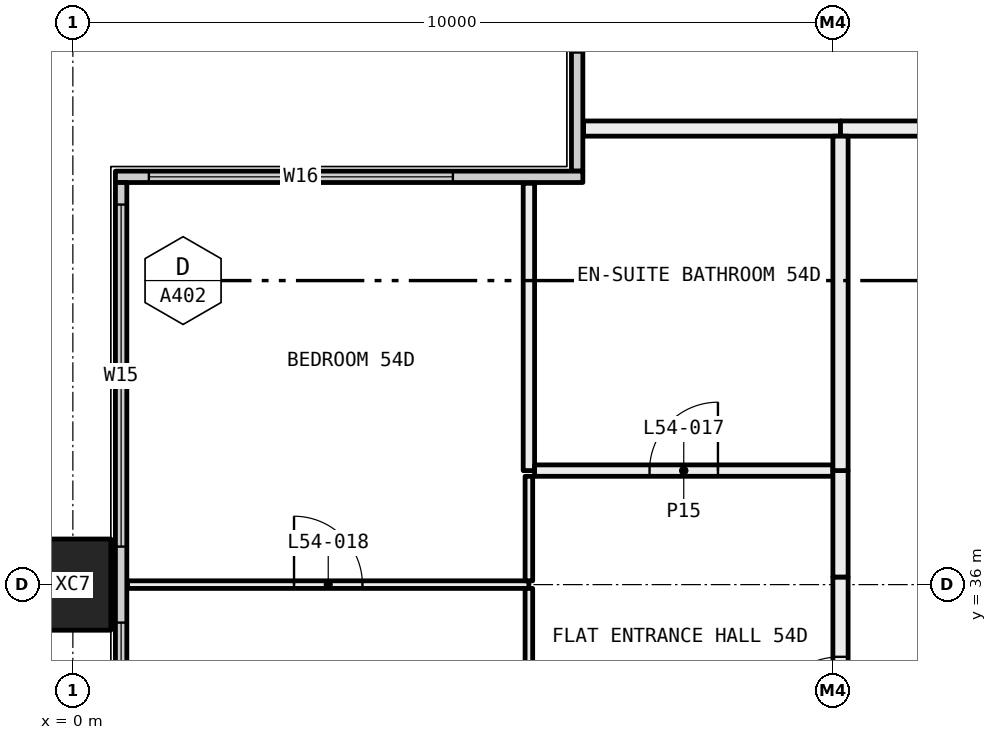
"""IFC4 building model, lengths in metres.
Left out: names, types, materials, properties, quantities, classifications, styles, units other than length and angle.
Written with IfcOpenShell. Run it as: python <this file> out.ifc"""

import sys

from ifc_helpers import new_model, si_unit, direction, frame, frame_2d, origin, origin_2d, place, context, subcontext, project, spatial, rectangle, hollow_rectangle, extrude, element, fill, save


model = new_model("IFC4")
c1 = context("Model", 3, precision=1e-05, world=origin(), true_north=direction((0.0, 1.0)))
c2 = subcontext(c1, "Body", "Model", "MODEL_VIEW")
j1 = project(units=[si_unit("LENGTHUNIT", "METRE"), si_unit("PLANEANGLEUNIT", "RADIAN")], contexts=[c1])
p1 = place(None, origin())
s1 = spatial("IfcSite", under=j1, at=p1, CompositionType="ELEMENT")
p2 = place(p1, origin())
s2 = spatial("IfcBuilding", under=s1, at=p2, CompositionType="ELEMENT")
p3 = place(p2, frame((0.0, 0.0, 203.1)))
s3 = spatial("IfcBuildingStorey", under=s2, at=p3, CompositionType="ELEMENT", Elevation=203.1)
p4 = place(p3, frame((0.0, 36.0, -0.4), z_axis=(0.0, 0.0, 1.0), x_axis=(0.0, 1.0, 0.0)))
e1 = element("IfcColumn", 1, at=p4, inside=s3, PredefinedType="COLUMN", context=c2, shape_type="SweptSolid", body=[
    extrude(hollow_rectangle(XDim=1.2, YDim=1.0, WallThickness=0.045, at=origin_2d()), origin(), (0.0, 0.0, 1.0), 3.45),
])
p5 = place(p3, frame((6.635, 41.44, 0.0), z_axis=(0.0, 0.0, 1.0), x_axis=(0.0, 1.0, 0.0)))
e2 = element("IfcWall", 2, at=p5, inside=s3, PredefinedType="ELEMENTEDWALL", context=c2, shape_type="SweptSolid", body=[
    extrude(rectangle(XDim=5.85, YDim=0.15, at=frame_2d((2.925, 0.0))), origin(), (0.0, 0.0, 1.0), 3.05),
])
p6 = place(p5, frame((1.56, 0.0, 0.45)))
e3 = element("IfcOpeningElement", 3, at=p6, cuts=e2, PredefinedType="OPENING", context=c2, shape_type="SweptSolid", body=[
    extrude(rectangle(XDim=4.0, YDim=2.55, at=frame_2d((2.0, 1.275))), frame((0.0, 0.085, 0.0), z_axis=(0.0, -1.0, 0.0), x_axis=(1.0, 0.0, 0.0)), (0.0, 0.0, 1.0), 0.17),
])
p7 = place(p3, frame((0.56, 41.365, 0.0), z_axis=(0.0, 0.0, 1.0), x_axis=(1.0, 0.0, 0.0)))
e4 = element("IfcWall", 4, at=p7, inside=s3, PredefinedType="ELEMENTEDWALL", context=c2, shape_type="SweptSolid", body=[
    extrude(rectangle(XDim=6.15, YDim=0.15, at=frame_2d((3.075, 0.0))), origin(), (0.0, 0.0, 1.0), 3.05),
])
p8 = place(p7, frame((0.44, 0.0, 0.45)))
e5 = element("IfcOpeningElement", 5, at=p8, cuts=e4, PredefinedType="OPENING", context=c2, shape_type="SweptSolid", body=[
    extrude(rectangle(XDim=4.0, YDim=2.55, at=frame_2d((2.0, 1.275))), frame((0.0, 0.085, 0.0), z_axis=(0.0, -1.0, 0.0), x_axis=(1.0, 0.0, 0.0)), (0.0, 0.0, 1.0), 0.17),
])
p9 = place(p3, frame((0.635, 18.71, 0.0), z_axis=(0.0, 0.0, 1.0), x_axis=(0.0, 1.0, 0.0)))
e6 = element("IfcWall", 6, at=p9, inside=s3, PredefinedType="ELEMENTEDWALL", context=c2, shape_type="SweptSolid", body=[
    extrude(rectangle(XDim=22.58, YDim=0.15, at=frame_2d((11.29, 0.0))), origin(), (0.0, 0.0, 1.0), 3.05),
])
p10 = place(p9, frame((0.29, 0.0, 0.45)))
e7 = element("IfcOpeningElement", 7, at=p10, cuts=e6, PredefinedType="OPENING", context=c2, shape_type="SweptSolid", body=[
    extrude(rectangle(XDim=4.5, YDim=2.55, at=frame_2d((2.25, 1.275))), frame((0.0, 0.085, 0.0), z_axis=(0.0, -1.0, 0.0), x_axis=(1.0, 0.0, 0.0)), (0.0, 0.0, 1.0), 0.17),
])
p11 = place(p9, frame((5.79, 0.0, 0.45)))
e8 = element("IfcOpeningElement", 8, at=p11, cuts=e6, PredefinedType="OPENING", context=c2, shape_type="SweptSolid", body=[
    extrude(rectangle(XDim=3.0, YDim=2.55, at=frame_2d((1.5, 1.275))), frame((0.0, 0.085, 0.0), z_axis=(0.0, -1.0, 0.0), x_axis=(1.0, 0.0, 0.0)), (0.0, 0.0, 1.0), 0.17),
])
p12 = place(p9, frame((14.79, 0.0, 0.45)))
e9 = element("IfcOpeningElement", 9, at=p12, cuts=e6, PredefinedType="OPENING", context=c2, shape_type="SweptSolid", body=[
    extrude(rectangle(XDim=2.0, YDim=2.55, at=frame_2d((1.0, 1.275))), frame((0.0, 0.085, 0.0), z_axis=(0.0, -1.0, 0.0), x_axis=(1.0, 0.0, 0.0)), (0.0, 0.0, 1.0), 0.17),
])
p13 = place(p9, frame((17.79, 0.0, 0.45)))
e10 = element("IfcOpeningElement", 10, at=p13, cuts=e6, PredefinedType="OPENING", context=c2, shape_type="SweptSolid", body=[
    extrude(rectangle(XDim=4.5, YDim=2.55, at=frame_2d((2.25, 1.275))), frame((0.0, 0.085, 0.0), z_axis=(0.0, -1.0, 0.0), x_axis=(1.0, 0.0, 0.0)), (0.0, 0.0, 1.0), 0.17),
])
p14 = place(p3, frame((6.72, 42.0, 0.0), z_axis=(0.0, 0.0, 1.0), x_axis=(1.0, 0.0, 0.0)))
e11 = element("IfcWall", 11, at=p14, inside=s3, PredefinedType="PARTITIONING", context=c2, shape_type="SweptSolid", body=[
    extrude(rectangle(XDim=3.38, YDim=0.2, at=frame_2d((1.69, 0.0))), origin(), (0.0, 0.0, 1.0), 3.05),
])
p15 = place(p3, frame((10.1, 42.0, 0.0), z_axis=(0.0, 0.0, 1.0), x_axis=(1.0, 0.0, 0.0)))
e12 = element("IfcWall", 12, at=p15, inside=s3, PredefinedType="PARTITIONING", context=c2, shape_type="SweptSolid", body=[
    extrude(rectangle(XDim=7.9, YDim=0.2, at=frame_2d((3.95, 0.0))), origin(), (0.0, 0.0, 1.0), 3.05),
])
p16 = place(p3, frame((6.0, 36.0, 0.0), z_axis=(0.0, 0.0, 1.0), x_axis=(-1.0, 0.0, 0.0)))
e13 = element("IfcWall", 13, at=p16, inside=s3, PredefinedType="PARTITIONING", context=c2, shape_type="SweptSolid", body=[
    extrude(rectangle(XDim=5.28, YDim=0.1, at=frame_2d((2.64, 0.0))), origin(), (0.0, 0.0, 1.0), 2.45),
])
p17 = place(p16, frame((2.19, 0.0, 0.0)))
e14 = element("IfcOpeningElement", 14, at=p17, cuts=e13, PredefinedType="OPENING", context=c2, shape_type="SweptSolid", body=[
    extrude(rectangle(XDim=0.9, YDim=2.1, at=frame_2d((0.45, 1.05))), frame((0.0, 0.06, 0.0), z_axis=(0.0, -1.0, 0.0), x_axis=(1.0, 0.0, 0.0)), (0.0, 0.0, 1.0), 0.12),
])
p18 = place(p3, frame((6.0, 33.0, 0.0), z_axis=(0.0, 0.0, 1.0), x_axis=(0.0, 1.0, 0.0)))
e15 = element("IfcWall", 15, at=p18, inside=s3, PredefinedType="PARTITIONING", context=c2, shape_type="SweptSolid", body=[
    extrude(rectangle(XDim=2.95, YDim=0.1, at=frame_2d((1.475, 0.0))), origin(), (0.0, 0.0, 1.0), 2.45),
])
p19 = place(p18, frame((1.025, 0.0, 0.0)))
e16 = element("IfcOpeningElement", 16, at=p19, cuts=e15, PredefinedType="OPENING", context=c2, shape_type="SweptSolid", body=[
    extrude(rectangle(XDim=0.9, YDim=2.1, at=frame_2d((0.45, 1.05))), frame((0.0, 0.06, 0.0), z_axis=(0.0, -1.0, 0.0), x_axis=(1.0, 0.0, 0.0)), (0.0, 0.0, 1.0), 0.12),
])
p20 = place(p3, frame((6.0, 36.05, 0.0), z_axis=(0.0, 0.0, 1.0), x_axis=(0.0, 1.0, 0.0)))
e17 = element("IfcWall", 17, at=p20, inside=s3, PredefinedType="PARTITIONING", context=c2, shape_type="SweptSolid", body=[
    extrude(rectangle(XDim=1.375, YDim=0.1, at=frame_2d((0.688, 0.0))), origin(), (0.0, 0.0, 1.0), 2.45),
])
p21 = place(p3, frame((6.0, 37.5, 0.0), z_axis=(0.0, 0.0, 1.0), x_axis=(0.0, 1.0, 0.0)))
e18 = element("IfcWall", 18, at=p21, inside=s3, PredefinedType="PARTITIONING", context=c2, shape_type="SweptSolid", body=[
    extrude(rectangle(XDim=3.78, YDim=0.15, at=frame_2d((1.89, 0.0))), origin(), (0.0, 0.0, 1.0), 3.05),
])
p22 = place(p3, frame((10.0, 37.5, 0.0), z_axis=(0.0, 0.0, 1.0), x_axis=(-1.0, 0.0, 0.0)))
e19 = element("IfcWall", 19, at=p22, inside=s3, PredefinedType="PARTITIONING", context=c2, shape_type="SweptSolid", body=[
    extrude(rectangle(XDim=3.925, YDim=0.15, at=frame_2d((1.962, 0.0))), origin(), (0.0, 0.0, 1.0), 3.05),
])
p23 = place(p22, frame((1.512, 0.0, 0.0)))
e20 = element("IfcOpeningElement", 20, at=p23, cuts=e19, PredefinedType="OPENING", context=c2, shape_type="SweptSolid", body=[
    extrude(rectangle(XDim=0.9, YDim=2.1, at=frame_2d((0.45, 1.05))), frame((0.0, 0.085, 0.0), z_axis=(0.0, -1.0, 0.0), x_axis=(1.0, 0.0, 0.0)), (0.0, 0.0, 1.0), 0.17),
])
p24 = place(p3, frame((10.1, 33.0, 0.0), z_axis=(0.0, 0.0, 1.0), x_axis=(0.0, 1.0, 0.0)))
e21 = element("IfcWall", 21, at=p24, inside=s3, PredefinedType="PARTITIONING", context=c2, shape_type="SweptSolid", body=[
    extrude(rectangle(XDim=3.1, YDim=0.2, at=frame_2d((1.55, 0.0))), origin(), (0.0, 0.0, 1.0), 2.45),
])
p25 = place(p24, frame((1.05, 0.0, 0.0)))
e22 = element("IfcOpeningElement", 22, at=p25, cuts=e21, PredefinedType="OPENING", context=c2, shape_type="SweptSolid", body=[
    extrude(rectangle(XDim=1.0, YDim=2.1, at=frame_2d((0.5, 1.05))), frame((0.0, 0.11, 0.0), z_axis=(0.0, -1.0, 0.0), x_axis=(1.0, 0.0, 0.0)), (0.0, 0.0, 1.0), 0.22),
])
p26 = place(p3, frame((10.1, 36.1, 0.0), z_axis=(0.0, 0.0, 1.0), x_axis=(0.0, 1.0, 0.0)))
e23 = element("IfcWall", 23, at=p26, inside=s3, PredefinedType="PARTITIONING", context=c2, shape_type="SweptSolid", body=[
    extrude(rectangle(XDim=1.4, YDim=0.2, at=frame_2d((0.7, 0.0))), origin(), (0.0, 0.0, 1.0), 3.05),
])
p27 = place(p3, frame((10.1, 37.5, 0.0), z_axis=(0.0, 0.0, 1.0), x_axis=(0.0, 1.0, 0.0)))
e24 = element("IfcWall", 24, at=p27, inside=s3, PredefinedType="PARTITIONING", context=c2, shape_type="SweptSolid", body=[
    extrude(rectangle(XDim=4.4, YDim=0.2, at=frame_2d((2.2, 0.0))), origin(), (0.0, 0.0, 1.0), 3.05),
])
p28 = place(p8, origin())
e25 = element("IfcWindow", 25, at=p28, inside=s3, PartitioningType="SINGLE_PANEL", PredefinedType="WINDOW", context=c2, shape_type="SweptSolid", body=[
    extrude(rectangle(XDim=4.0, YDim=2.55, at=frame_2d((2.0, 1.275))), frame((0.0, 0.03, 0.0), z_axis=(0.0, -1.0, 0.0), x_axis=(1.0, 0.0, 0.0)), (0.0, 0.0, 1.0), 0.06),
])
fill(e5, e25)
p29 = place(p12, origin())
e26 = element("IfcWindow", 26, at=p29, inside=s3, PartitioningType="SINGLE_PANEL", PredefinedType="WINDOW", context=c2, shape_type="SweptSolid", body=[
    extrude(rectangle(XDim=2.0, YDim=2.55, at=frame_2d((1.0, 1.275))), frame((0.0, 0.03, 0.0), z_axis=(0.0, -1.0, 0.0), x_axis=(1.0, 0.0, 0.0)), (0.0, 0.0, 1.0), 0.06),
])
fill(e9, e26)
p30 = place(p13, origin())
e27 = element("IfcWindow", 27, at=p30, inside=s3, PartitioningType="SINGLE_PANEL", PredefinedType="WINDOW", context=c2, shape_type="SweptSolid", body=[
    extrude(rectangle(XDim=4.5, YDim=2.55, at=frame_2d((2.25, 1.275))), frame((0.0, 0.03, 0.0), z_axis=(0.0, -1.0, 0.0), x_axis=(1.0, 0.0, 0.0)), (0.0, 0.0, 1.0), 0.06),
])
fill(e10, e27)
p31 = place(p25, origin())
e28 = element("IfcDoor", 28, at=p31, inside=s3, OperationType="SINGLE_SWING_RIGHT", PredefinedType="DOOR", context=c2, shape_type="SweptSolid", body=[
    extrude(rectangle(XDim=1.0, YDim=2.1, at=frame_2d((0.5, 1.05))), frame((0.0, 0.025, 0.0), z_axis=(0.0, -1.0, 0.0), x_axis=(1.0, 0.0, 0.0)), (0.0, 0.0, 1.0), 0.05),
])
fill(e22, e28)
p32 = place(p23, frame((0.9, 0.0, 0.0), x_axis=(-1.0, 0.0, 0.0)))
e29 = element("IfcDoor", 29, at=p32, inside=s3, OperationType="SINGLE_SWING_LEFT", PredefinedType="DOOR", context=c2, shape_type="SweptSolid", body=[
    extrude(rectangle(XDim=0.9, YDim=2.1, at=frame_2d((0.45, 1.05))), frame((0.0, 0.025, 0.0), z_axis=(0.0, -1.0, 0.0), x_axis=(1.0, 0.0, 0.0)), (0.0, 0.0, 1.0), 0.05),
])
fill(e20, e29)
p33 = place(p17, frame((0.9, 0.0, 0.0), x_axis=(-1.0, 0.0, 0.0)))
e30 = element("IfcDoor", 30, at=p33, inside=s3, OperationType="SINGLE_SWING_RIGHT", PredefinedType="DOOR", context=c2, shape_type="SweptSolid", body=[
    extrude(rectangle(XDim=0.9, YDim=2.1, at=frame_2d((0.45, 1.05))), frame((0.0, 0.025, 0.0), z_axis=(0.0, -1.0, 0.0), x_axis=(1.0, 0.0, 0.0)), (0.0, 0.0, 1.0), 0.05),
])
fill(e14, e30)
save(model, sys.argv[1])
